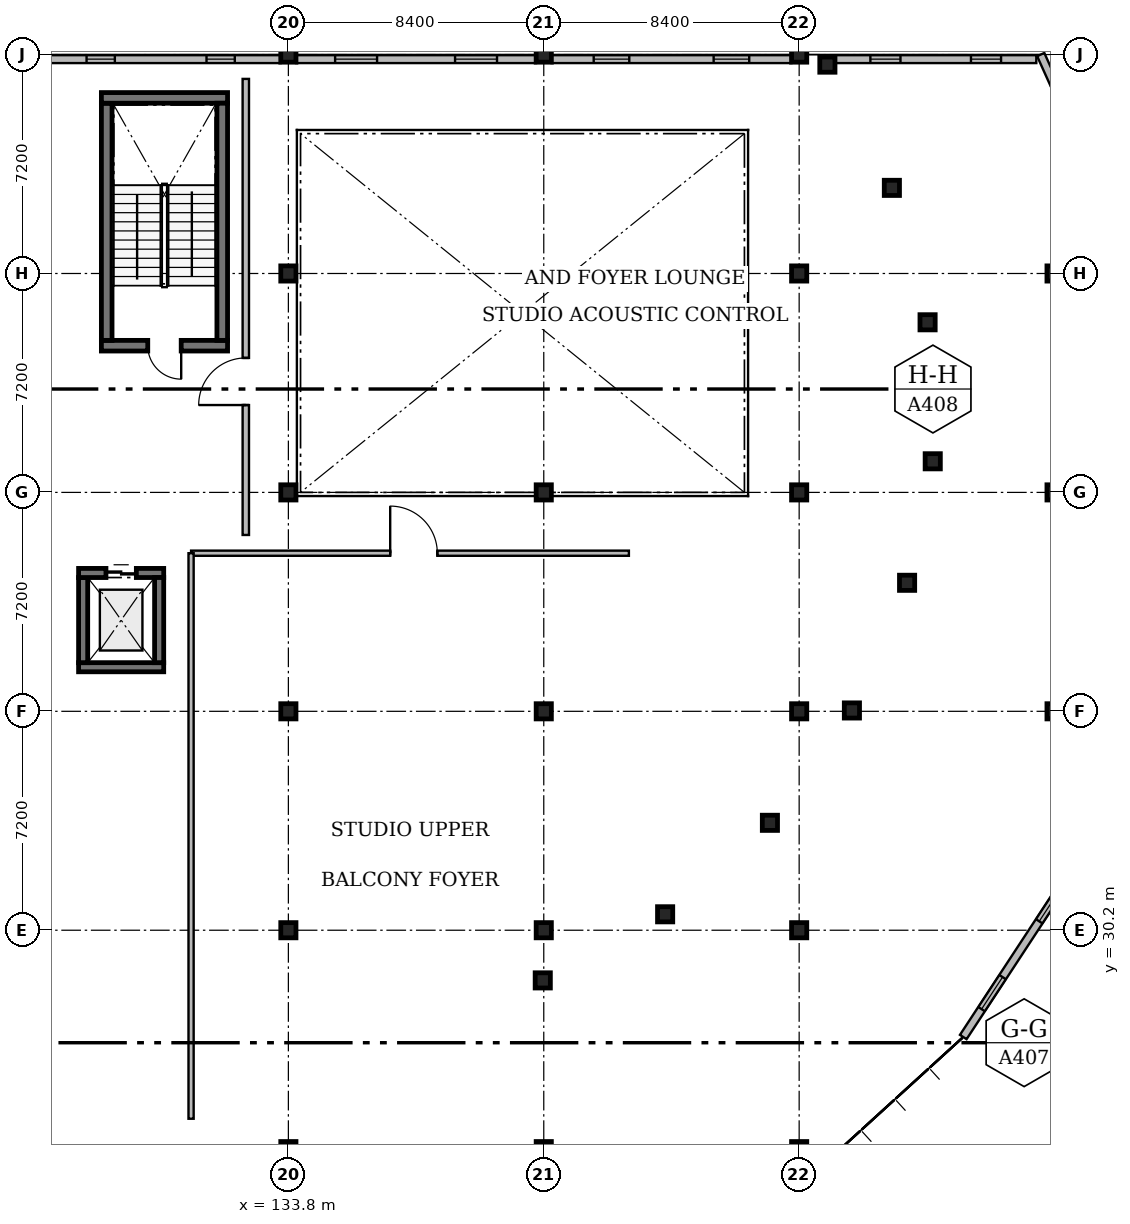
"""IFC4 building model, lengths in metres.
Left out: names, types, materials, properties, quantities, classifications, styles, units other than length and angle.
Written with IfcOpenShell. Run it as: python <this file> out.ifc"""

import sys

from ifc_helpers import new_model, si_unit, direction, frame, frame_2d, origin, origin_2d, place, context, subcontext, project, spatial, rectangle, extrude, element, fill, save


model = new_model("IFC4")
c1 = context("Model", 3, precision=1e-05, world=origin(), true_north=direction((0.0, 1.0)))
c2 = subcontext(c1, "Body", "Model", "MODEL_VIEW")
j1 = project(units=[si_unit("LENGTHUNIT", "METRE"), si_unit("PLANEANGLEUNIT", "RADIAN")], contexts=[c1])
p1 = place(None, origin())
s1 = spatial("IfcSite", under=j1, at=p1, CompositionType="ELEMENT")
p2 = place(p1, origin())
s2 = spatial("IfcBuilding", under=s1, at=p2, CompositionType="ELEMENT")
p3 = place(p2, frame((0.0, 0.0, 4.8)))
s3 = spatial("IfcBuildingStorey", under=s2, at=p3, CompositionType="ELEMENT", Elevation=4.8)
for number, where, z_axis, x_axis in (
    (1, (133.8, 23.0, 0.0), (0.0, 0.0, 1.0), (1.0, 0.0, 0.0)),
    (2, (133.8, 30.2, 0.0), (0.0, 0.0, 1.0), (1.0, 0.0, 0.0)),
    (3, (133.8, 37.4, 0.0), (0.0, 0.0, 1.0), (1.0, 0.0, 0.0)),
    (4, (133.8, 44.6, 0.0), (0.0, 0.0, 1.0), (1.0, 0.0, 0.0)),
    (5, (133.8, 51.8, 0.0), (0.0, 0.0, 1.0), (1.0, 0.0, 0.0)),
    (6, (133.8, 59.0, 0.0), (0.0, 0.0, 1.0), (1.0, 0.0, 0.0)),
    (7, (142.2, 23.0, 0.0), (0.0, 0.0, 1.0), (1.0, 0.0, 0.0)),
    (8, (142.2, 30.2, 0.0), (0.0, 0.0, 1.0), (1.0, 0.0, 0.0)),
    (9, (142.2, 37.4, 0.0), (0.0, 0.0, 1.0), (1.0, 0.0, 0.0)),
    (10, (142.2, 44.6, 0.0), (0.0, 0.0, 1.0), (1.0, 0.0, 0.0)),
    (11, (142.2, 59.0, 0.0), (0.0, 0.0, 1.0), (1.0, 0.0, 0.0)),
    (12, (150.6, 23.0, 0.0), (0.0, 0.0, 1.0), (1.0, 0.0, 0.0)),
    (13, (150.6, 30.2, 0.0), (0.0, 0.0, 1.0), (1.0, 0.0, 0.0)),
    (14, (150.6, 37.4, 0.0), (0.0, 0.0, 1.0), (1.0, 0.0, 0.0)),
    (15, (150.6, 44.6, 0.0), (0.0, 0.0, 1.0), (1.0, 0.0, 0.0)),
    (16, (150.6, 51.8, 0.0), (0.0, 0.0, 1.0), (1.0, 0.0, 0.0)),
    (17, (150.6, 59.0, 0.0), (0.0, 0.0, 1.0), (1.0, 0.0, 0.0)),
    (18, (159.0, 37.4, 0.0), (0.0, 0.0, 1.0), (1.0, 0.0, 0.0)),
    (19, (159.0, 44.6, 0.0), (0.0, 0.0, 1.0), (1.0, 0.0, 0.0)),
    (20, (159.0, 51.8, 0.0), (0.0, 0.0, 1.0), (1.0, 0.0, 0.0)),
    (21, (151.528, 58.669, 0.0), (0.0, 0.0, 1.0), (1.0, 0.0, 0.0)),
    (22, (153.649, 54.616, 0.0), (0.0, 0.0, 1.0), (1.0, 0.0, 0.0)),
    (23, (154.824, 50.195, 0.0), (0.0, 0.0, 1.0), (1.0, 0.0, 0.0)),
    (24, (154.993, 45.623, 0.0), (0.0, 0.0, 1.0), (1.0, 0.0, 0.0)),
    (25, (154.15, 41.627, 0.0), (0.0, 0.0, 1.0), (1.0, 0.0, 0.0)),
    (26, (152.335, 37.428, 0.0), (0.0, 0.0, 1.0), (1.0, 0.0, 0.0)),
    (27, (149.638, 33.733, 0.0), (0.0, 0.0, 1.0), (1.0, 0.0, 0.0)),
    (28, (146.192, 30.724, 0.0), (0.0, 0.0, 1.0), (1.0, 0.0, 0.0)),
    (29, (142.167, 28.55, 0.0), (0.0, 0.0, 1.0), (1.0, 0.0, 0.0)),
):
    element("IfcColumn", number, at=place(p3, frame(where, z_axis=z_axis, x_axis=x_axis)), inside=s3, PredefinedType="COLUMN", context=c2, shape_type="SweptSolid", body=[
        extrude(rectangle(XDim=0.5, YDim=0.5, at=origin_2d()), origin(), (0.0, 0.0, 1.0), 4.2),
    ])
p4 = place(p3, frame((131.8, 49.425, 0.0), z_axis=(0.0, 0.0, 1.0), x_axis=(-1.0, 0.0, 0.0)))
e30 = element("IfcWall", 30, at=p4, inside=s3, PredefinedType="SOLIDWALL", context=c2, shape_type="SweptSolid", body=[
    extrude(rectangle(XDim=4.15, YDim=0.35, at=frame_2d((2.075, 0.0))), origin(), (0.0, 0.0, 1.0), 4.2),
])
p5 = place(p4, frame((1.525, 0.0, 0.0)))
e31 = element("IfcOpeningElement", 31, at=p5, cuts=e30, PredefinedType="OPENING", context=c2, shape_type="SweptSolid", body=[
    extrude(rectangle(XDim=1.1, YDim=2.15, at=frame_2d((0.55, 1.075))), frame((0.0, 0.195, 0.0), z_axis=(0.0, -1.0, 0.0), x_axis=(1.0, 0.0, 0.0)), (0.0, 0.0, 1.0), 0.39),
])
p6 = place(p3, frame((127.825, 49.6, 0.0), z_axis=(0.0, 0.0, 1.0), x_axis=(0.0, 1.0, 0.0)))
e32 = element("IfcWall", 32, at=p6, inside=s3, PredefinedType="SOLIDWALL", context=c2, shape_type="SweptSolid", body=[
    extrude(rectangle(XDim=7.8, YDim=0.35, at=frame_2d((3.9, 0.0))), origin(), (0.0, 0.0, 1.0), 4.2),
])
p7 = place(p3, frame((127.65, 57.575, 0.0), z_axis=(0.0, 0.0, 1.0), x_axis=(1.0, 0.0, 0.0)))
e33 = element("IfcWall", 33, at=p7, inside=s3, PredefinedType="SOLIDWALL", context=c2, shape_type="SweptSolid", body=[
    extrude(rectangle(XDim=4.15, YDim=0.35, at=frame_2d((2.075, 0.0))), origin(), (0.0, 0.0, 1.0), 4.2),
])
p8 = place(p3, frame((131.625, 57.4, 0.0), z_axis=(0.0, 0.0, 1.0), x_axis=(0.0, -1.0, 0.0)))
e34 = element("IfcWall", 34, at=p8, inside=s3, PredefinedType="SOLIDWALL", context=c2, shape_type="SweptSolid", body=[
    extrude(rectangle(XDim=7.8, YDim=0.35, at=frame_2d((3.9, 0.0))), origin(), (0.0, 0.0, 1.0), 4.2),
])
for number, where, z_axis, x_axis in (
    (35, (129.7, 38.85, 0.0), (0.0, 0.0, 1.0), (-1.0, 0.0, 0.0)),
    (36, (127.05, 39.0, 0.0), (0.0, 0.0, 1.0), (0.0, 1.0, 0.0)),
):
    element("IfcWall", number, at=place(p3, frame(where, z_axis=z_axis, x_axis=x_axis)), inside=s3, PredefinedType="SOLIDWALL", context=c2, shape_type="SweptSolid", body=[
        extrude(rectangle(XDim=2.8, YDim=0.3, at=frame_2d((1.4, 0.0))), origin(), (0.0, 0.0, 1.0), 4.2),
    ])
p9 = place(p3, frame((126.9, 41.95, 0.0), z_axis=(0.0, 0.0, 1.0), x_axis=(1.0, 0.0, 0.0)))
e37 = element("IfcWall", 37, at=p9, inside=s3, PredefinedType="SOLIDWALL", context=c2, shape_type="SweptSolid", body=[
    extrude(rectangle(XDim=2.8, YDim=0.3, at=frame_2d((1.4, 0.0))), origin(), (0.0, 0.0, 1.0), 4.2),
])
p10 = place(p9, frame((0.9, 0.0, 0.0)))
e38 = element("IfcOpeningElement", 38, at=p10, cuts=e37, PredefinedType="OPENING", context=c2, shape_type="SweptSolid", body=[
    extrude(rectangle(XDim=1.0, YDim=2.15, at=frame_2d((0.5, 1.075))), frame((0.0, 0.17, 0.0), z_axis=(0.0, -1.0, 0.0), x_axis=(1.0, 0.0, 0.0)), (0.0, 0.0, 1.0), 0.34),
])
p11 = place(p3, frame((129.55, 41.8, 0.0), z_axis=(0.0, 0.0, 1.0), x_axis=(0.0, -1.0, 0.0)))
e39 = element("IfcWall", 39, at=p11, inside=s3, PredefinedType="SOLIDWALL", context=c2, shape_type="SweptSolid", body=[
    extrude(rectangle(XDim=2.8, YDim=0.3, at=frame_2d((1.4, 0.0))), origin(), (0.0, 0.0, 1.0), 4.2),
])
p12 = place(p3, frame((155.998, 26.687, 0.0), z_axis=(0.0, 0.0, 1.0), x_axis=(0.548668788702, 0.836039807846, 0.0)))
e40 = element("IfcWall", 40, at=p12, inside=s3, PredefinedType="SOLIDWALL", context=c2, shape_type="SweptSolid", body=[
    extrude(rectangle(XDim=6.91, YDim=0.26, at=frame_2d((3.455, 0.0))), origin(), (0.0, 0.0, 1.0), 3.94),
])
p13 = place(p12, frame((1.098, 0.0, 0.95)))
e41 = element("IfcOpeningElement", 41, at=p13, cuts=e40, PredefinedType="OPENING", context=c2, shape_type="SweptSolid", body=[
    extrude(rectangle(XDim=1.26, YDim=1.65, at=frame_2d((0.63, 0.825))), frame((0.0, 0.15, 0.0), z_axis=(0.0, -1.0, 0.0), x_axis=(1.0, 0.0, 0.0)), (0.0, 0.0, 1.0), 0.3),
])
p14 = place(p12, frame((4.553, 0.0, 0.95)))
e42 = element("IfcOpeningElement", 42, at=p14, cuts=e40, PredefinedType="OPENING", context=c2, shape_type="SweptSolid", body=[
    extrude(rectangle(XDim=1.26, YDim=1.65, at=frame_2d((0.63, 0.825))), frame((0.0, 0.15, 0.0), z_axis=(0.0, -1.0, 0.0), x_axis=(1.0, 0.0, 0.0)), (0.0, 0.0, 1.0), 0.3),
])
p15 = place(p3, frame((161.385, 52.7, 0.0), z_axis=(0.0, 0.0, 1.0), x_axis=(-0.410843511641, 0.911705878528, 0.0)))
e43 = element("IfcWall", 43, at=p15, inside=s3, PredefinedType="SOLIDWALL", context=c2, shape_type="SweptSolid", body=[
    extrude(rectangle(XDim=6.91, YDim=0.26, at=frame_2d((3.455, 0.0))), origin(), (0.0, 0.0, 1.0), 3.94),
])
p16 = place(p15, frame((1.068, 0.0, 0.95)))
e44 = element("IfcOpeningElement", 44, at=p16, cuts=e43, PredefinedType="OPENING", context=c2, shape_type="SweptSolid", body=[
    extrude(rectangle(XDim=1.32, YDim=1.9, at=frame_2d((0.66, 0.95))), frame((0.0, 0.15, 0.0), z_axis=(0.0, -1.0, 0.0), x_axis=(1.0, 0.0, 0.0)), (0.0, 0.0, 1.0), 0.3),
])
p17 = place(p15, frame((4.523, 0.0, 0.95)))
e45 = element("IfcOpeningElement", 45, at=p17, cuts=e43, PredefinedType="OPENING", context=c2, shape_type="SweptSolid", body=[
    extrude(rectangle(XDim=1.32, YDim=1.9, at=frame_2d((0.66, 0.95))), frame((0.0, 0.15, 0.0), z_axis=(0.0, -1.0, 0.0), x_axis=(1.0, 0.0, 0.0)), (0.0, 0.0, 1.0), 0.3),
])
p18 = place(p3, frame((125.655, 58.85, 0.0), z_axis=(0.0, 0.0, 1.0), x_axis=(1.0, 0.0, 0.0)))
e46 = element("IfcWall", 46, at=p18, inside=s3, PredefinedType="SOLIDWALL", context=c2, shape_type="SweptSolid", body=[
    extrude(rectangle(XDim=7.89, YDim=0.26, at=frame_2d((3.945, 0.0))), origin(), (0.0, 0.0, 1.0), 3.273),
])
p19 = place(p18, frame((1.508, 0.0, 0.95)))
e47 = element("IfcOpeningElement", 47, at=p19, cuts=e46, PredefinedType="OPENING", context=c2, shape_type="SweptSolid", body=[
    extrude(rectangle(XDim=0.93, YDim=1.55, at=frame_2d((0.465, 0.775))), frame((0.0, 0.15, 0.0), z_axis=(0.0, -1.0, 0.0), x_axis=(1.0, 0.0, 0.0)), (0.0, 0.0, 1.0), 0.3),
])
p20 = place(p18, frame((5.452, 0.0, 0.95)))
e48 = element("IfcOpeningElement", 48, at=p20, cuts=e46, PredefinedType="OPENING", context=c2, shape_type="SweptSolid", body=[
    extrude(rectangle(XDim=0.93, YDim=1.55, at=frame_2d((0.465, 0.775))), frame((0.0, 0.15, 0.0), z_axis=(0.0, -1.0, 0.0), x_axis=(1.0, 0.0, 0.0)), (0.0, 0.0, 1.0), 0.3),
])
p21 = place(p3, frame((134.055, 58.85, 0.0), z_axis=(0.0, 0.0, 1.0), x_axis=(1.0, 0.0, 0.0)))
e49 = element("IfcWall", 49, at=p21, inside=s3, PredefinedType="SOLIDWALL", context=c2, shape_type="SweptSolid", body=[
    extrude(rectangle(XDim=7.89, YDim=0.26, at=frame_2d((3.945, 0.0))), origin(), (0.0, 0.0, 1.0), 3.273),
])
p22 = place(p21, frame((1.282, 0.0, 0.95)))
e50 = element("IfcOpeningElement", 50, at=p22, cuts=e49, PredefinedType="OPENING", context=c2, shape_type="SweptSolid", body=[
    extrude(rectangle(XDim=1.38, YDim=1.7, at=frame_2d((0.69, 0.85))), frame((0.0, 0.15, 0.0), z_axis=(0.0, -1.0, 0.0), x_axis=(1.0, 0.0, 0.0)), (0.0, 0.0, 1.0), 0.3),
])
p23 = place(p21, frame((5.228, 0.0, 0.95)))
e51 = element("IfcOpeningElement", 51, at=p23, cuts=e49, PredefinedType="OPENING", context=c2, shape_type="SweptSolid", body=[
    extrude(rectangle(XDim=1.38, YDim=1.7, at=frame_2d((0.69, 0.85))), frame((0.0, 0.15, 0.0), z_axis=(0.0, -1.0, 0.0), x_axis=(1.0, 0.0, 0.0)), (0.0, 0.0, 1.0), 0.3),
])
p24 = place(p3, frame((142.455, 58.85, 0.0), z_axis=(0.0, 0.0, 1.0), x_axis=(1.0, 0.0, 0.0)))
e52 = element("IfcWall", 52, at=p24, inside=s3, PredefinedType="SOLIDWALL", context=c2, shape_type="SweptSolid", body=[
    extrude(rectangle(XDim=7.89, YDim=0.26, at=frame_2d((3.945, 0.0))), origin(), (0.0, 0.0, 1.0), 3.273),
])
p25 = place(p24, frame((1.387, 0.0, 0.95)))
e53 = element("IfcOpeningElement", 53, at=p25, cuts=e52, PredefinedType="OPENING", context=c2, shape_type="SweptSolid", body=[
    extrude(rectangle(XDim=1.17, YDim=1.85, at=frame_2d((0.585, 0.925))), frame((0.0, 0.15, 0.0), z_axis=(0.0, -1.0, 0.0), x_axis=(1.0, 0.0, 0.0)), (0.0, 0.0, 1.0), 0.3),
])
p26 = place(p24, frame((5.333, 0.0, 0.95)))
e54 = element("IfcOpeningElement", 54, at=p26, cuts=e52, PredefinedType="OPENING", context=c2, shape_type="SweptSolid", body=[
    extrude(rectangle(XDim=1.17, YDim=1.85, at=frame_2d((0.585, 0.925))), frame((0.0, 0.15, 0.0), z_axis=(0.0, -1.0, 0.0), x_axis=(1.0, 0.0, 0.0)), (0.0, 0.0, 1.0), 0.3),
])
p27 = place(p3, frame((151.783, 58.85, 0.0), z_axis=(0.0, 0.0, 1.0), x_axis=(1.0, 0.0, 0.0)))
e55 = element("IfcWall", 55, at=p27, inside=s3, PredefinedType="SOLIDWALL", context=c2, shape_type="SweptSolid", body=[
    extrude(rectangle(XDim=6.617, YDim=0.26, at=frame_2d((3.308, 0.0))), origin(), (0.0, 0.0, 1.0), 3.94),
])
p28 = place(p27, frame((1.159, 0.0, 0.95)))
e56 = element("IfcOpeningElement", 56, at=p28, cuts=e55, PredefinedType="OPENING", context=c2, shape_type="SweptSolid", body=[
    extrude(rectangle(XDim=0.99, YDim=1.55, at=frame_2d((0.495, 0.775))), frame((0.0, 0.15, 0.0), z_axis=(0.0, -1.0, 0.0), x_axis=(1.0, 0.0, 0.0)), (0.0, 0.0, 1.0), 0.3),
])
p29 = place(p27, frame((4.468, 0.0, 0.95)))
e57 = element("IfcOpeningElement", 57, at=p29, cuts=e55, PredefinedType="OPENING", context=c2, shape_type="SweptSolid", body=[
    extrude(rectangle(XDim=0.99, YDim=1.55, at=frame_2d((0.495, 0.775))), frame((0.0, 0.15, 0.0), z_axis=(0.0, -1.0, 0.0), x_axis=(1.0, 0.0, 0.0)), (0.0, 0.0, 1.0), 0.3),
])
p30 = place(p3, frame((130.6, 42.6, 0.0), z_axis=(0.0, 0.0, 1.0), x_axis=(1.0, 0.0, 0.0)))
e58 = element("IfcWall", 58, at=p30, inside=s3, PredefinedType="PARTITIONING", context=c2, shape_type="SweptSolid", body=[
    extrude(rectangle(XDim=14.4, YDim=0.17, at=frame_2d((7.2, 0.0))), origin(), (0.0, 0.0, 1.0), 3.94),
])
p31 = place(p30, frame((6.549, 0.0, 0.0)))
e59 = element("IfcOpeningElement", 59, at=p31, cuts=e58, PredefinedType="OPENING", context=c2, shape_type="SweptSolid", body=[
    extrude(rectangle(XDim=1.55, YDim=2.2, at=frame_2d((0.775, 1.1))), frame((0.0, 0.105, 0.0), z_axis=(0.0, -1.0, 0.0), x_axis=(1.0, 0.0, 0.0)), (0.0, 0.0, 1.0), 0.21),
])
p32 = place(p3, frame((130.6, 24.0, 0.0), z_axis=(0.0, 0.0, 1.0), x_axis=(0.0, 1.0, 0.0)))
e60 = element("IfcWall", 60, at=p32, inside=s3, PredefinedType="PARTITIONING", context=c2, shape_type="SweptSolid", body=[
    extrude(rectangle(XDim=18.6, YDim=0.17, at=frame_2d((9.3, 0.0))), origin(), (0.0, 0.0, 1.0), 3.94),
])
p33 = place(p3, frame((132.4, 43.2, 0.0), z_axis=(0.0, 0.0, 1.0), x_axis=(0.0, 1.0, 0.0)))
e61 = element("IfcWall", 61, at=p33, inside=s3, PredefinedType="PARTITIONING", context=c2, shape_type="SweptSolid", body=[
    extrude(rectangle(XDim=15.0, YDim=0.21, at=frame_2d((7.5, 0.0))), origin(), (0.0, 0.0, 1.0), 3.94),
])
p34 = place(p33, frame((4.273, 0.0, 0.0)))
e62 = element("IfcOpeningElement", 62, at=p34, cuts=e61, PredefinedType="OPENING", context=c2, shape_type="SweptSolid", body=[
    extrude(rectangle(XDim=1.55, YDim=2.2, at=frame_2d((0.775, 1.1))), frame((0.0, 0.125, 0.0), z_axis=(0.0, -1.0, 0.0), x_axis=(1.0, 0.0, 0.0)), (0.0, 0.0, 1.0), 0.25),
])
p35 = place(p5, origin())
e63 = element("IfcDoor", 63, at=p35, inside=s3, OperationType="SINGLE_SWING_LEFT", PredefinedType="DOOR", context=c2, shape_type="SweptSolid", body=[
    extrude(rectangle(XDim=1.1, YDim=2.15, at=frame_2d((0.55, 1.075))), frame((0.0, 0.025, 0.0), z_axis=(0.0, -1.0, 0.0), x_axis=(1.0, 0.0, 0.0)), (0.0, 0.0, 1.0), 0.05),
])
fill(e31, e63)
p36 = place(p10, origin())
e64 = element("IfcDoor", 64, at=p36, inside=s3, OperationType="DOUBLE_DOOR_SLIDING", PredefinedType="DOOR", context=c2, shape_type="SweptSolid", body=[
    extrude(rectangle(XDim=1.0, YDim=2.15, at=frame_2d((0.5, 1.075))), frame((0.0, 0.025, 0.0), z_axis=(0.0, -1.0, 0.0), x_axis=(1.0, 0.0, 0.0)), (0.0, 0.0, 1.0), 0.05),
])
fill(e38, e64)
p37 = place(p13, origin())
e65 = element("IfcWindow", 65, at=p37, inside=s3, PartitioningType="SINGLE_PANEL", PredefinedType="WINDOW", context=c2, shape_type="SweptSolid", body=[
    extrude(rectangle(XDim=1.26, YDim=1.65, at=frame_2d((0.63, 0.825))), frame((0.0, 0.03, 0.0), z_axis=(0.0, -1.0, 0.0), x_axis=(1.0, 0.0, 0.0)), (0.0, 0.0, 1.0), 0.06),
])
fill(e41, e65)
p38 = place(p14, origin())
e66 = element("IfcWindow", 66, at=p38, inside=s3, PartitioningType="SINGLE_PANEL", PredefinedType="WINDOW", context=c2, shape_type="SweptSolid", body=[
    extrude(rectangle(XDim=1.26, YDim=1.65, at=frame_2d((0.63, 0.825))), frame((0.0, 0.03, 0.0), z_axis=(0.0, -1.0, 0.0), x_axis=(1.0, 0.0, 0.0)), (0.0, 0.0, 1.0), 0.06),
])
fill(e42, e66)
p39 = place(p19, origin())
e67 = element("IfcWindow", 67, at=p39, inside=s3, PartitioningType="SINGLE_PANEL", PredefinedType="WINDOW", context=c2, shape_type="SweptSolid", body=[
    extrude(rectangle(XDim=0.93, YDim=1.55, at=frame_2d((0.465, 0.775))), frame((0.0, 0.03, 0.0), z_axis=(0.0, -1.0, 0.0), x_axis=(1.0, 0.0, 0.0)), (0.0, 0.0, 1.0), 0.06),
])
fill(e47, e67)
p40 = place(p20, origin())
e68 = element("IfcWindow", 68, at=p40, inside=s3, PartitioningType="SINGLE_PANEL", PredefinedType="WINDOW", context=c2, shape_type="SweptSolid", body=[
    extrude(rectangle(XDim=0.93, YDim=1.55, at=frame_2d((0.465, 0.775))), frame((0.0, 0.03, 0.0), z_axis=(0.0, -1.0, 0.0), x_axis=(1.0, 0.0, 0.0)), (0.0, 0.0, 1.0), 0.06),
])
fill(e48, e68)
p41 = place(p22, origin())
e69 = element("IfcWindow", 69, at=p41, inside=s3, PartitioningType="SINGLE_PANEL", PredefinedType="WINDOW", context=c2, shape_type="SweptSolid", body=[
    extrude(rectangle(XDim=1.38, YDim=1.7, at=frame_2d((0.69, 0.85))), frame((0.0, 0.03, 0.0), z_axis=(0.0, -1.0, 0.0), x_axis=(1.0, 0.0, 0.0)), (0.0, 0.0, 1.0), 0.06),
])
fill(e50, e69)
p42 = place(p23, origin())
e70 = element("IfcWindow", 70, at=p42, inside=s3, PartitioningType="SINGLE_PANEL", PredefinedType="WINDOW", context=c2, shape_type="SweptSolid", body=[
    extrude(rectangle(XDim=1.38, YDim=1.7, at=frame_2d((0.69, 0.85))), frame((0.0, 0.03, 0.0), z_axis=(0.0, -1.0, 0.0), x_axis=(1.0, 0.0, 0.0)), (0.0, 0.0, 1.0), 0.06),
])
fill(e51, e70)
p43 = place(p25, origin())
e71 = element("IfcWindow", 71, at=p43, inside=s3, PartitioningType="SINGLE_PANEL", PredefinedType="WINDOW", context=c2, shape_type="SweptSolid", body=[
    extrude(rectangle(XDim=1.17, YDim=1.85, at=frame_2d((0.585, 0.925))), frame((0.0, 0.03, 0.0), z_axis=(0.0, -1.0, 0.0), x_axis=(1.0, 0.0, 0.0)), (0.0, 0.0, 1.0), 0.06),
])
fill(e53, e71)
p44 = place(p26, origin())
e72 = element("IfcWindow", 72, at=p44, inside=s3, PartitioningType="SINGLE_PANEL", PredefinedType="WINDOW", context=c2, shape_type="SweptSolid", body=[
    extrude(rectangle(XDim=1.17, YDim=1.85, at=frame_2d((0.585, 0.925))), frame((0.0, 0.03, 0.0), z_axis=(0.0, -1.0, 0.0), x_axis=(1.0, 0.0, 0.0)), (0.0, 0.0, 1.0), 0.06),
])
fill(e54, e72)
p45 = place(p28, origin())
e73 = element("IfcWindow", 73, at=p45, inside=s3, PartitioningType="SINGLE_PANEL", PredefinedType="WINDOW", context=c2, shape_type="SweptSolid", body=[
    extrude(rectangle(XDim=0.99, YDim=1.55, at=frame_2d((0.495, 0.775))), frame((0.0, 0.03, 0.0), z_axis=(0.0, -1.0, 0.0), x_axis=(1.0, 0.0, 0.0)), (0.0, 0.0, 1.0), 0.06),
])
fill(e56, e73)
p46 = place(p29, origin())
e74 = element("IfcWindow", 74, at=p46, inside=s3, PartitioningType="SINGLE_PANEL", PredefinedType="WINDOW", context=c2, shape_type="SweptSolid", body=[
    extrude(rectangle(XDim=0.99, YDim=1.55, at=frame_2d((0.495, 0.775))), frame((0.0, 0.03, 0.0), z_axis=(0.0, -1.0, 0.0), x_axis=(1.0, 0.0, 0.0)), (0.0, 0.0, 1.0), 0.06),
])
fill(e57, e74)
p47 = place(p31, origin())
e75 = element("IfcDoor", 75, at=p47, inside=s3, OperationType="DOUBLE_DOOR_SINGLE_SWING", PredefinedType="DOOR", context=c2, shape_type="SweptSolid", body=[
    extrude(rectangle(XDim=1.55, YDim=2.2, at=frame_2d((0.775, 1.1))), frame((0.0, 0.025, 0.0), z_axis=(0.0, -1.0, 0.0), x_axis=(1.0, 0.0, 0.0)), (0.0, 0.0, 1.0), 0.05),
])
fill(e59, e75)
p48 = place(p34, origin())
e76 = element("IfcDoor", 76, at=p48, inside=s3, OperationType="DOUBLE_DOOR_SINGLE_SWING", PredefinedType="DOOR", context=c2, shape_type="SweptSolid", body=[
    extrude(rectangle(XDim=1.55, YDim=2.2, at=frame_2d((0.775, 1.1))), frame((0.0, 0.025, 0.0), z_axis=(0.0, -1.0, 0.0), x_axis=(1.0, 0.0, 0.0)), (0.0, 0.0, 1.0), 0.05),
])
fill(e62, e76)
save(model, sys.argv[1])
